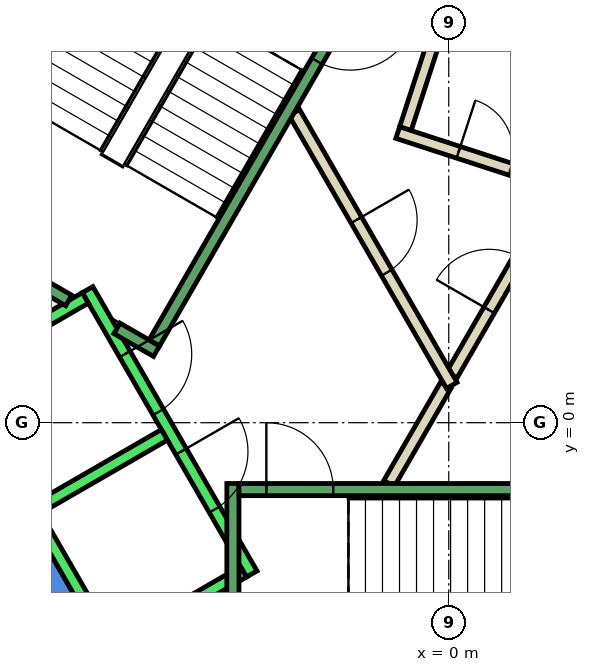
"""IFC4 building model, lengths in metres.
Left out: names, types, materials, properties, quantities, classifications, styles, units other than length and angle.
Written with IfcOpenShell. Run it as: python <this file> out.ifc"""

import sys

from ifc_helpers import new_model, si_unit, direction, frame, frame_2d, origin, place, context, subcontext, project, spatial, polyline, rectangle, outline, extrude, element, fill, save


model = new_model("IFC4")
c1 = context("Model", 3, precision=1e-05, world=origin(), true_north=direction((0.0, 1.0)))
c2 = subcontext(c1, "Body", "Model", "MODEL_VIEW")
j1 = project(units=[si_unit("LENGTHUNIT", "METRE"), si_unit("PLANEANGLEUNIT", "RADIAN")], contexts=[c1])
p1 = place(None, origin())
s1 = spatial("IfcSite", under=j1, at=p1, CompositionType="ELEMENT")
p2 = place(p1, origin())
s2 = spatial("IfcBuilding", under=s1, at=p2, CompositionType="ELEMENT")
p3 = place(p2, frame((0.0, 0.0, 297.2)))
s3 = spatial("IfcBuildingStorey", under=s2, at=p3, CompositionType="ELEMENT", Elevation=297.2)
p4 = place(p3, frame((0.0, 0.0, -0.34)))
e1 = element("IfcWall", 1, at=p4, inside=s3, PredefinedType="SHEAR", context=c2, shape_type="SweptSolid", body=[
    extrude(outline(polyline([(-9.236, 3.502), (-8.803, 3.253), (-4.619, 10.5), (-4.907, 11.0), (-9.236, 3.502)])), origin(), (0.0, 0.0, 1.0), 3.6),
])
p5 = place(p3, frame((0.0, 0.0, -0.34)))
e2 = element("IfcWall", 2, at=p5, inside=s3, PredefinedType="SHEAR", context=c2, shape_type="SweptSolid", body=[
    extrude(outline(polyline([(-9.815, 2.5), (-4.907, -6.0), (-4.619, -5.5), (-9.238, 2.5), (-9.815, 2.5)])), origin(), (0.0, 0.0, 1.0), 3.6),
])
p6 = place(p3, frame((2.06, 5.931, 0.0), z_axis=(0.0, 0.0, 1.0), x_axis=(-0.95092855133, 0.309410552932, 0.0)))
e3 = element("IfcWall", 3, at=p6, inside=s3, PredefinedType="PARTITIONING", context=c2, shape_type="SweptSolid", body=[
    extrude(rectangle(XDim=2.399, YDim=0.2, at=frame_2d((1.199, 0.0))), origin(), (0.0, 0.0, 1.0), 3.26),
])
p7 = place(p3, frame((-0.157, 6.547, 0.0), z_axis=(0.0, 0.0, 1.0), x_axis=(-0.308813127339, -0.951122732555, 0.0)))
e4 = element("IfcWall", 4, at=p7, inside=s3, PredefinedType="PARTITIONING", context=c2, shape_type="SweptSolid", body=[
    extrude(rectangle(XDim=1.8, YDim=0.2, at=frame_2d((0.9, 0.0))), origin(), (0.0, 0.0, 1.0), 3.26),
])
p8 = place(p3, frame((-0.839, 4.771, 0.0), z_axis=(0.0, 0.0, 1.0), x_axis=(0.950961084355, -0.309310549515, 0.0)))
e5 = element("IfcWall", 5, at=p8, inside=s3, PredefinedType="PARTITIONING", context=c2, shape_type="SweptSolid", body=[
    extrude(rectangle(XDim=3.0, YDim=0.2, at=frame_2d((1.5, 0.0))), origin(), (0.0, 0.0, 1.0), 3.26),
])
p9 = place(p8, frame((1.05, 0.0, 0.0)))
e6 = element("IfcOpeningElement", 6, at=p9, cuts=e5, PredefinedType="OPENING", context=c2, shape_type="SweptSolid", body=[
    extrude(rectangle(XDim=0.9, YDim=2.1, at=frame_2d((0.45, 1.05))), frame((0.0, 0.11, 0.0), z_axis=(0.0, -1.0, 0.0), x_axis=(1.0, 0.0, 0.0)), (0.0, 0.0, 1.0), 0.22),
])
p10 = place(p3, frame((-0.982, -1.0, 0.0), z_axis=(0.0, 0.0, 1.0), x_axis=(0.50024047865, 0.865886518847, 0.0)))
e7 = element("IfcWall", 7, at=p10, inside=s3, PredefinedType="PARTITIONING", context=c2, shape_type="SweptSolid", body=[
    extrude(rectangle(XDim=1.863, YDim=0.2, at=frame_2d((0.931, 0.0))), origin(), (0.0, 0.0, 1.0), 3.26),
])
p11 = place(p3, frame((0.05, 0.787, 0.0), z_axis=(0.0, 0.0, 1.0), x_axis=(0.499954076797, 0.866051915934, 0.0)))
e8 = element("IfcWall", 8, at=p11, inside=s3, PredefinedType="PARTITIONING", context=c2, shape_type="SweptSolid", body=[
    extrude(rectangle(XDim=3.558, YDim=0.2, at=frame_2d((1.779, 0.0))), origin(), (0.0, 0.0, 1.0), 3.26),
])
p12 = place(p11, frame((1.229, 0.0, 0.0)))
e9 = element("IfcOpeningElement", 9, at=p12, cuts=e8, PredefinedType="OPENING", context=c2, shape_type="SweptSolid", body=[
    extrude(rectangle(XDim=1.0, YDim=2.1, at=frame_2d((0.5, 1.05))), frame((0.0, 0.11, 0.0), z_axis=(0.0, -1.0, 0.0), x_axis=(1.0, 0.0, 0.0)), (0.0, 0.0, 1.0), 0.22),
])
p13 = place(p3, frame((-2.54, 5.1, 0.0), z_axis=(0.0, 0.0, 1.0), x_axis=(0.499925051871, -0.866068670783, 0.0)))
e10 = element("IfcWall", 10, at=p13, inside=s3, PredefinedType="PARTITIONING", context=c2, shape_type="SweptSolid", body=[
    extrude(rectangle(XDim=5.181, YDim=0.2, at=frame_2d((2.59, 0.0))), origin(), (0.0, 0.0, 1.0), 3.26),
])
p14 = place(p13, frame((2.04, 0.0, 0.0)))
e11 = element("IfcOpeningElement", 11, at=p14, cuts=e10, PredefinedType="OPENING", context=c2, shape_type="SweptSolid", body=[
    extrude(rectangle(XDim=1.0, YDim=2.1, at=frame_2d((0.5, 1.05))), frame((0.0, 0.11, 0.0), z_axis=(0.0, -1.0, 0.0), x_axis=(1.0, 0.0, 0.0)), (0.0, 0.0, 1.0), 0.22),
])
p15 = place(p3, frame((-5.94, 2.188, 0.0), z_axis=(0.0, 0.0, 1.0), x_axis=(0.500034260056, -0.866005622828, 0.0)))
e12 = element("IfcWall", 12, at=p15, inside=s3, PredefinedType="STANDARD", context=c2, shape_type="SweptSolid", body=[
    extrude(rectangle(XDim=5.399, YDim=0.2, at=frame_2d((2.7, 0.0))), origin(), (0.0, 0.0, 1.0), 3.26),
])
p16 = place(p15, frame((3.075, 0.0, 0.0)))
e13 = element("IfcOpeningElement", 13, at=p16, cuts=e12, PredefinedType="OPENING", context=c2, shape_type="SweptSolid", body=[
    extrude(rectangle(XDim=1.1, YDim=2.1, at=frame_2d((0.55, 1.05))), frame((0.0, 0.11, 0.0), z_axis=(0.0, -1.0, 0.0), x_axis=(1.0, 0.0, 0.0)), (0.0, 0.0, 1.0), 0.22),
])
p17 = place(p15, frame((1.225, 0.0, 0.0)))
e14 = element("IfcOpeningElement", 14, at=p17, cuts=e12, PredefinedType="OPENING", context=c2, shape_type="SweptSolid", body=[
    extrude(rectangle(XDim=1.1, YDim=2.1, at=frame_2d((0.55, 1.05))), frame((0.0, 0.11, 0.0), z_axis=(0.0, -1.0, 0.0), x_axis=(1.0, 0.0, 0.0)), (0.0, 0.0, 1.0), 0.22),
])
p18 = place(p3, frame((-8.192, 0.888, 0.0), z_axis=(0.0, 0.0, 1.0), x_axis=(0.500034260056, -0.866005622828, 0.0)))
e15 = element("IfcWall", 15, at=p18, inside=s3, PredefinedType="STANDARD", context=c2, shape_type="SweptSolid", body=[
    extrude(rectangle(XDim=5.399, YDim=0.2, at=frame_2d((2.7, 0.0))), origin(), (0.0, 0.0, 1.0), 3.26),
])
for number, where, z_axis, x_axis in (
    (16, (-5.977, 2.052, 0.0), (0.0, 0.0, 1.0), (-0.866, -0.5, 0.0)),
    (17, (-4.677, -0.2, 0.0), (0.0, 0.0, 1.0), (-0.866, -0.5, 0.0)),
):
    element("IfcWall", number, at=place(p3, frame(where, z_axis=z_axis, x_axis=x_axis)), inside=s3, PredefinedType="STANDARD", context=c2, shape_type="SweptSolid", body=[
        extrude(rectangle(XDim=2.399, YDim=0.2, at=frame_2d((1.2, 0.0))), origin(), (0.0, 0.0, 1.0), 3.26),
    ])
p19 = place(p3, frame((-3.377, -2.452, 0.0), z_axis=(0.0, 0.0, 1.0), x_axis=(-0.865955154139, -0.50012165622, 0.0)))
e18 = element("IfcWall", 18, at=p19, inside=s3, PredefinedType="STANDARD", context=c2, shape_type="SweptSolid", body=[
    extrude(rectangle(XDim=2.4, YDim=0.2, at=frame_2d((1.2, 0.0))), origin(), (0.0, 0.0, 1.0), 3.26),
])
p20 = place(p3, frame((-3.55, -1.0, 0.0), z_axis=(0.0, 0.0, 1.0), x_axis=(0.0, -1.0, 0.0)))
e19 = element("IfcWall", 19, at=p20, inside=s3, PredefinedType="STANDARD", context=c2, shape_type="SweptSolid", body=[
    extrude(rectangle(XDim=4.4, YDim=0.2, at=frame_2d((2.2, 0.0))), origin(), (0.0, 0.0, 1.0), 3.26),
])
p21 = place(p20, frame((2.4, 0.0, 0.0)))
e20 = element("IfcOpeningElement", 20, at=p21, cuts=e19, PredefinedType="OPENING", context=c2, shape_type="SweptSolid", body=[
    extrude(rectangle(XDim=1.1, YDim=2.2, at=frame_2d((0.55, 1.1))), frame((0.0, 0.11, 0.0), z_axis=(0.0, -1.0, 0.0), x_axis=(1.0, 0.0, 0.0)), (0.0, 0.0, 1.0), 0.22),
])
p22 = place(p3, frame((-3.45, -1.1, 0.0), z_axis=(0.0, 0.0, 1.0), x_axis=(1.0, 0.0, 0.0)))
e21 = element("IfcWall", 21, at=p22, inside=s3, PredefinedType="STANDARD", context=c2, shape_type="SweptSolid", body=[
    extrude(rectangle(XDim=6.9, YDim=0.2, at=frame_2d((3.45, 0.0))), origin(), (0.0, 0.0, 1.0), 3.26),
])
p23 = place(p22, frame((0.45, 0.0, 0.0)))
e22 = element("IfcOpeningElement", 22, at=p23, cuts=e21, PredefinedType="OPENING", context=c2, shape_type="SweptSolid", body=[
    extrude(rectangle(XDim=1.1, YDim=2.2, at=frame_2d((0.55, 1.1))), frame((0.0, 0.11, 0.0), z_axis=(0.0, -1.0, 0.0), x_axis=(1.0, 0.0, 0.0)), (0.0, 0.0, 1.0), 0.22),
])
p24 = place(p3, frame((-6.25, 2.01, 0.0), z_axis=(0.0, 0.0, 1.0), x_axis=(-0.86611865017, 0.499838457731, 0.0)))
e23 = element("IfcWall", 23, at=p24, inside=s3, PredefinedType="STANDARD", context=c2, shape_type="SweptSolid", body=[
    extrude(rectangle(XDim=2.733, YDim=0.2, at=frame_2d((1.366, 0.0))), origin(), (0.0, 0.0, 1.0), 3.26),
])
p25 = place(p3, frame((-4.806, 1.176, 0.0), z_axis=(0.0, 0.0, 1.0), x_axis=(-0.866558586415, 0.499075361355, 0.0)))
e24 = element("IfcWall", 24, at=p25, inside=s3, PredefinedType="STANDARD", context=c2, shape_type="SweptSolid", body=[
    extrude(rectangle(XDim=0.751, YDim=0.2, at=frame_2d((0.376, 0.0))), origin(), (0.0, 0.0, 1.0), 3.26),
])
p26 = place(p3, frame((-1.393, 7.288, 0.0), z_axis=(0.0, 0.0, 1.0), x_axis=(-0.499963383562, -0.866046543262, 0.0)))
e25 = element("IfcWall", 25, at=p26, inside=s3, PredefinedType="STANDARD", context=c2, shape_type="SweptSolid", body=[
    extrude(rectangle(XDim=6.9, YDim=0.2, at=frame_2d((3.45, 0.0))), origin(), (0.0, 0.0, 1.0), 3.26),
])
p27 = place(p26, frame((0.45, 0.0, 0.0)))
e26 = element("IfcOpeningElement", 26, at=p27, cuts=e25, PredefinedType="OPENING", context=c2, shape_type="SweptSolid", body=[
    extrude(rectangle(XDim=1.1, YDim=2.2, at=frame_2d((0.55, 1.1))), frame((0.0, 0.11, 0.0), z_axis=(0.0, -1.0, 0.0), x_axis=(1.0, 0.0, 0.0)), (0.0, 0.0, 1.0), 0.22),
])
p28 = place(p3, frame((-5.03, 9.388, 0.0), z_axis=(0.0, 0.0, 1.0), x_axis=(-0.499978703459, -0.866037698999, 0.0)))
e27 = element("IfcWall", 27, at=p28, inside=s3, PredefinedType="STANDARD", context=c2, shape_type="SweptSolid", body=[
    extrude(rectangle(XDim=6.9, YDim=0.2, at=frame_2d((3.45, 0.0))), origin(), (0.0, 0.0, 1.0), 3.26),
])
p29 = place(p12, origin())
e28 = element("IfcDoor", 28, at=p29, inside=s3, OperationType="SINGLE_SWING_RIGHT", PredefinedType="DOOR", context=c2, shape_type="SweptSolid", body=[
    extrude(rectangle(XDim=1.0, YDim=2.1, at=frame_2d((0.5, 1.05))), frame((0.0, 0.025, 0.0), z_axis=(0.0, -1.0, 0.0), x_axis=(1.0, 0.0, 0.0)), (0.0, 0.0, 1.0), 0.05),
])
fill(e9, e28)
p30 = place(p14, origin())
e29 = element("IfcDoor", 29, at=p30, inside=s3, OperationType="SINGLE_SWING_RIGHT", PredefinedType="DOOR", context=c2, shape_type="SweptSolid", body=[
    extrude(rectangle(XDim=1.0, YDim=2.1, at=frame_2d((0.5, 1.05))), frame((0.0, 0.025, 0.0), z_axis=(0.0, -1.0, 0.0), x_axis=(1.0, 0.0, 0.0)), (0.0, 0.0, 1.0), 0.05),
])
fill(e11, e29)
p31 = place(p9, origin())
e30 = element("IfcDoor", 30, at=p31, inside=s3, OperationType="SINGLE_SWING_LEFT", PredefinedType="DOOR", context=c2, shape_type="SweptSolid", body=[
    extrude(rectangle(XDim=0.9, YDim=2.1, at=frame_2d((0.45, 1.05))), frame((0.0, 0.025, 0.0), z_axis=(0.0, -1.0, 0.0), x_axis=(1.0, 0.0, 0.0)), (0.0, 0.0, 1.0), 0.05),
])
fill(e6, e30)
p32 = place(p16, origin())
e31 = element("IfcDoor", 31, at=p32, inside=s3, OperationType="SLIDING_TO_LEFT", PredefinedType="DOOR", context=c2, shape_type="SweptSolid", body=[
    extrude(rectangle(XDim=1.1, YDim=2.1, at=frame_2d((0.55, 1.05))), frame((0.0, 0.025, 0.0), z_axis=(0.0, -1.0, 0.0), x_axis=(1.0, 0.0, 0.0)), (0.0, 0.0, 1.0), 0.05),
])
fill(e13, e31)
p33 = place(p17, origin())
e32 = element("IfcDoor", 32, at=p33, inside=s3, OperationType="SLIDING_TO_LEFT", PredefinedType="DOOR", context=c2, shape_type="SweptSolid", body=[
    extrude(rectangle(XDim=1.1, YDim=2.1, at=frame_2d((0.55, 1.05))), frame((0.0, 0.025, 0.0), z_axis=(0.0, -1.0, 0.0), x_axis=(1.0, 0.0, 0.0)), (0.0, 0.0, 1.0), 0.05),
])
fill(e14, e32)
p34 = place(p23, origin())
e33 = element("IfcDoor", 33, at=p34, inside=s3, OperationType="SINGLE_SWING_LEFT", PredefinedType="DOOR", context=c2, shape_type="SweptSolid", body=[
    extrude(rectangle(XDim=1.1, YDim=2.2, at=frame_2d((0.55, 1.1))), frame((0.0, 0.025, 0.0), z_axis=(0.0, -1.0, 0.0), x_axis=(1.0, 0.0, 0.0)), (0.0, 0.0, 1.0), 0.05),
])
fill(e22, e33)
p35 = place(p27, origin())
e34 = element("IfcDoor", 34, at=p35, inside=s3, OperationType="SINGLE_SWING_LEFT", PredefinedType="DOOR", context=c2, shape_type="SweptSolid", body=[
    extrude(rectangle(XDim=1.1, YDim=2.2, at=frame_2d((0.55, 1.1))), frame((0.0, 0.025, 0.0), z_axis=(0.0, -1.0, 0.0), x_axis=(1.0, 0.0, 0.0)), (0.0, 0.0, 1.0), 0.05),
])
fill(e26, e34)
save(model, sys.argv[1])
